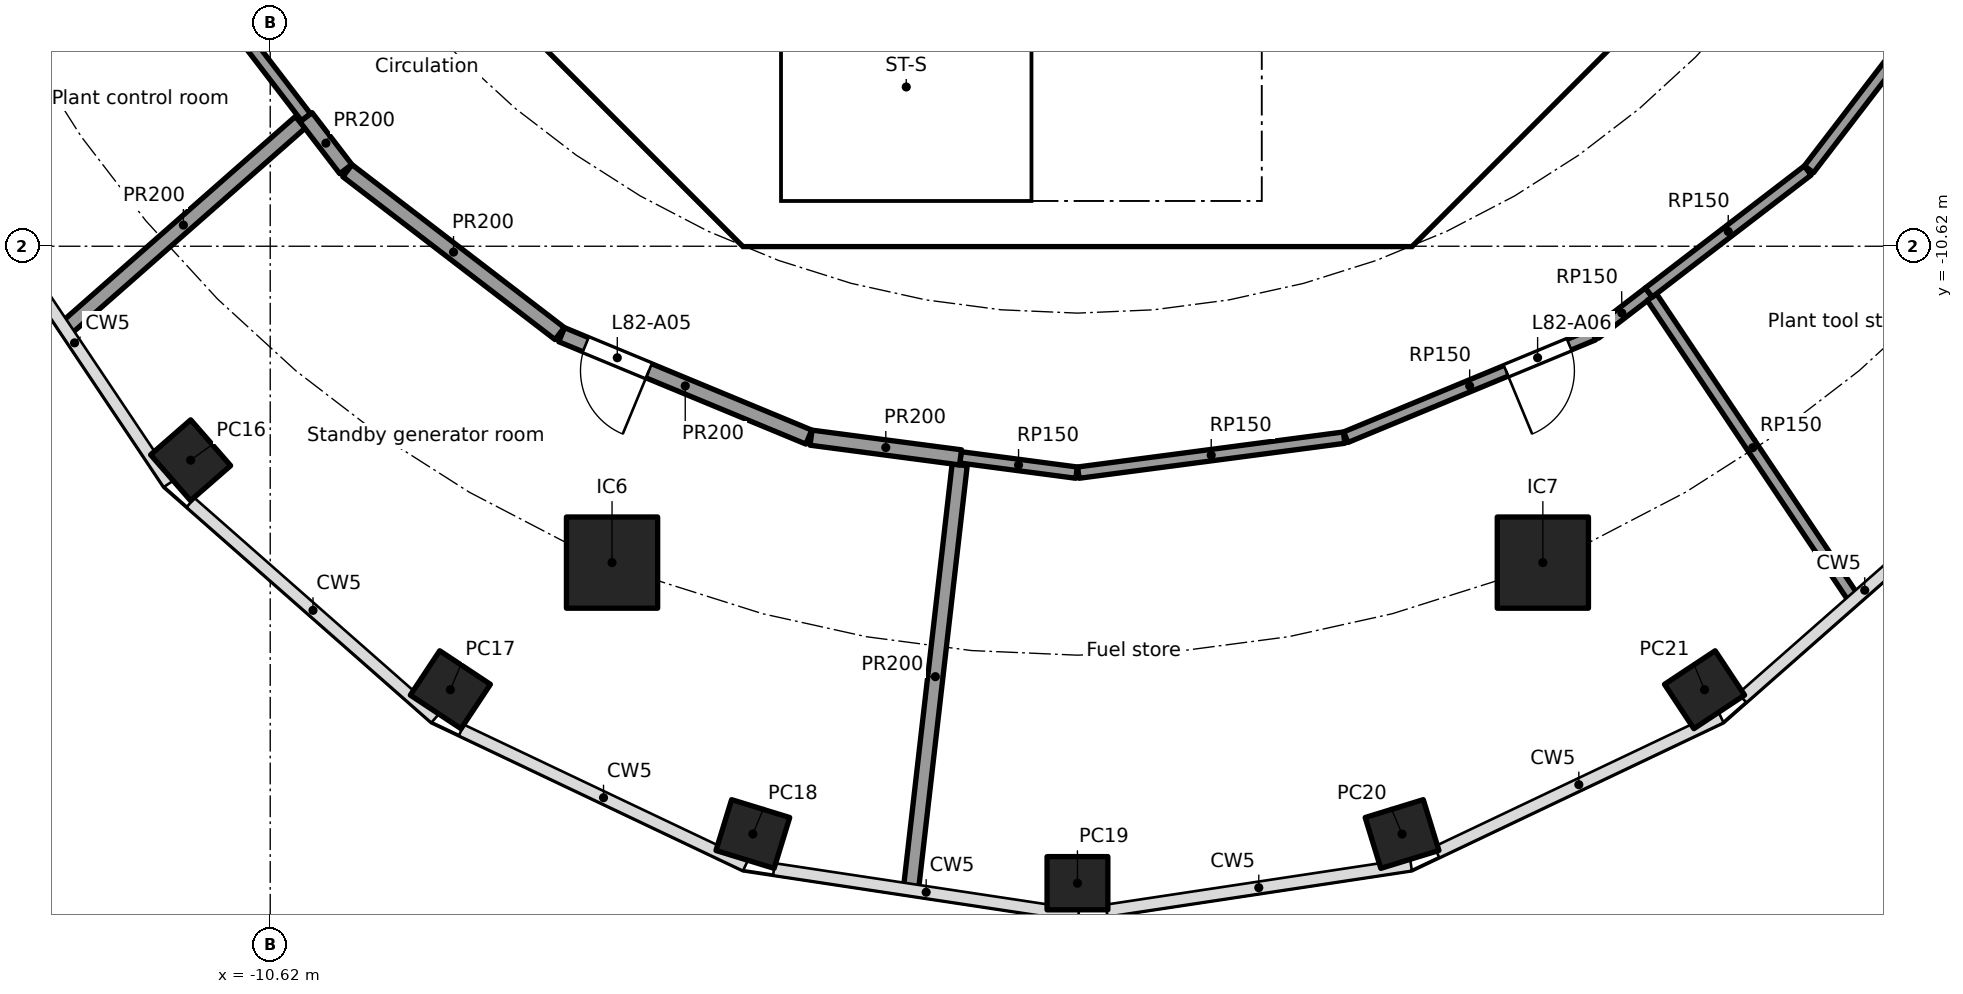
"""IFC4 building model, lengths in metres.
Left out: names, types, materials, properties, quantities, classifications, styles, units other than length and angle.
Written with IfcOpenShell. Run it as: python <this file> out.ifc"""

import sys

from ifc_helpers import new_model, si_unit, direction, frame, frame_2d, origin, origin_2d, place, context, subcontext, project, spatial, polyline, rectangle, hollow_rectangle, outline, extrude, element, fill, save


model = new_model("IFC4")
c1 = context("Model", 3, precision=1e-05, world=origin(), true_north=direction((0.0, 1.0)))
c2 = subcontext(c1, "Body", "Model", "MODEL_VIEW")
j1 = project(units=[si_unit("LENGTHUNIT", "METRE"), si_unit("PLANEANGLEUNIT", "RADIAN")], contexts=[c1])
p1 = place(None, origin())
s1 = spatial("IfcSite", under=j1, at=p1, CompositionType="ELEMENT")
p2 = place(p1, origin())
s2 = spatial("IfcBuilding", under=s1, at=p2, CompositionType="ELEMENT")
p3 = place(p2, frame((0.0, 0.0, 332.9)))
s3 = spatial("IfcBuildingStorey", under=s2, at=p3, CompositionType="ELEMENT", Elevation=332.9)
for number, where, z_axis, x_axis in (
    (1, (-11.667, -13.435, 0.0), (0.0, 0.0, 1.0), (0.657, -0.754, 0.0)),
    (2, (-8.25, -16.455, 0.0), (0.0, 0.0, 1.0), (0.834, -0.552, 0.0)),
    (3, (-4.271, -18.353, 0.0), (0.0, 0.0, 1.0), (0.956, -0.294, 0.0)),
    (4, (0.0, -19.0, 0.0), (0.0, 0.0, 1.0), (1.0, 0.0, 0.0)),
    (5, (4.271, -18.353, 0.0), (0.0, 0.0, 1.0), (0.956, 0.294, 0.0)),
    (6, (8.25, -16.455, 0.0), (0.0, 0.0, 1.0), (0.834, 0.552, 0.0)),
):
    element("IfcColumn", number, at=place(p3, frame(where, z_axis=z_axis, x_axis=x_axis)), inside=s3, PredefinedType="COLUMN", context=c2, shape_type="SweptSolid", body=[
        extrude(hollow_rectangle(XDim=0.8, YDim=0.7, WallThickness=0.025, at=origin_2d()), origin(), (0.0, 0.0, 1.0), 4.0),
    ])
for number, where, z_axis, x_axis in (
    (7, (-6.123, -14.782, 0.0), (0.0, 0.0, 1.0), (1.0, 0.0, 0.0)),
    (8, (6.123, -14.782, 0.0), (0.0, 0.0, 1.0), (1.0, 0.0, 0.0)),
):
    element("IfcColumn", number, at=place(p3, frame(where, z_axis=z_axis, x_axis=x_axis)), inside=s3, PredefinedType="COLUMN", context=c2, shape_type="SweptSolid", body=[
        extrude(rectangle(XDim=1.2, YDim=1.2, at=origin_2d()), origin(), (0.0, 0.0, 1.0), 4.0),
    ])
p4 = place(p3, frame((-9.988, -4.613, 0.0), z_axis=(0.0, 0.0, 1.0), x_axis=(0.707106781187, -0.707106781187, 0.0)))
e9 = element("IfcWall", 9, at=p4, inside=s3, PredefinedType="SHEAR", context=c2, shape_type="SweptSolid", body=[
    extrude(rectangle(XDim=7.602, YDim=0.6, at=frame_2d((3.801, 0.0))), origin(), (0.0, 0.0, 1.0), 3.7),
])
p5 = place(p4, frame((6.151, 0.0, 0.0)))
e10 = element("IfcOpeningElement", 10, at=p5, cuts=e9, PredefinedType="OPENING", context=c2, shape_type="SweptSolid", body=[
    extrude(rectangle(XDim=1.1, YDim=2.1, at=frame_2d((0.55, 1.05))), frame((0.0, 0.31, 0.0), z_axis=(0.0, -1.0, 0.0), x_axis=(1.0, 0.0, 0.0)), (0.0, 0.0, 1.0), 0.62),
])
p6 = place(p3, frame((4.613, -9.988, 0.0), z_axis=(0.0, 0.0, 1.0), x_axis=(0.707106781187, 0.707106781187, 0.0)))
e11 = element("IfcWall", 11, at=p6, inside=s3, PredefinedType="SHEAR", context=c2, shape_type="SweptSolid", body=[
    extrude(rectangle(XDim=7.602, YDim=0.6, at=frame_2d((3.801, 0.0))), origin(), (0.0, 0.0, 1.0), 3.7),
])
p7 = place(p6, frame((3.201, 0.0, 0.0)))
e12 = element("IfcOpeningElement", 12, at=p7, cuts=e11, PredefinedType="OPENING", context=c2, shape_type="SweptSolid", body=[
    extrude(rectangle(XDim=1.2, YDim=2.1, at=frame_2d((0.6, 1.05))), frame((0.0, 0.31, 0.0), z_axis=(0.0, -1.0, 0.0), x_axis=(1.0, 0.0, 0.0)), (0.0, 0.0, 1.0), 0.62),
])
p8 = place(p3, frame((4.0, -10.025, 0.0), z_axis=(0.0, 0.0, 1.0), x_axis=(0.0, 1.0, 0.0)))
e13 = element("IfcWall", 13, at=p8, inside=s3, PredefinedType="SOLIDWALL", context=c2, shape_type="SweptSolid", body=[
    extrude(rectangle(XDim=3.0, YDim=0.2, at=frame_2d((1.5, 0.0))), origin(), (0.0, 0.0, 1.0), 3.7),
])
p9 = place(p8, frame((0.975, 0.0, 0.0)))
e14 = element("IfcOpeningElement", 14, at=p9, cuts=e13, PredefinedType="OPENING", context=c2, shape_type="SweptSolid", body=[
    extrude(rectangle(XDim=1.1, YDim=2.1, at=frame_2d((0.55, 1.05))), frame((0.0, 0.11, 0.0), z_axis=(0.0, -1.0, 0.0), x_axis=(1.0, 0.0, 0.0)), (0.0, 0.0, 1.0), 0.22),
])
p10 = place(p3, origin())
e15 = element("IfcWall", 15, at=p10, inside=s3, PredefinedType="SHEAR", context=c2, shape_type="SweptSolid", body=[
    extrude(outline(polyline([(-4.152, -10.025), (4.152, -10.025), (4.401, -9.776), (4.825, -10.2), (4.401, -10.625), (-4.401, -10.625), (-4.825, -10.2), (-4.401, -9.776), (-4.152, -10.025)])), origin(), (0.0, 0.0, 1.0), 3.7),
])
p11 = place(p3, origin())
e16 = element("IfcWall", 16, at=p11, inside=s3, PredefinedType="SOLIDWALL", context=c2, shape_type="SweptSolid", body=[
    extrude(outline(polyline([(-3.9, -10.025), (-4.1, -10.025), (-4.1, -7.025), (-3.9, -7.025), (-3.9, -10.025)])), origin(), (0.0, 0.0, 1.0), 3.7),
])
p12 = place(p3, frame((-10.149, -8.923, 0.0), z_axis=(0.0, 0.0, 1.0), x_axis=(-0.608731606531, 0.793376222993, 0.0)))
e17 = element("IfcWall", 17, at=p12, inside=s3, PredefinedType="PARTITIONING", context=c2, shape_type="SweptSolid", body=[
    extrude(rectangle(XDim=2.664, YDim=0.15, at=frame_2d((1.332, 0.0))), origin(), (0.0, 0.0, 1.0), 3.7),
])
p13 = place(p3, frame((-0.012, -13.598, 0.0), z_axis=(0.0, 0.0, 1.0), x_axis=(-0.991446737275, 0.130511942543, 0.0)))
e18 = element("IfcWall", 18, at=p13, inside=s3, PredefinedType="PARTITIONING", context=c2, shape_type="SweptSolid", body=[
    extrude(rectangle(XDim=1.54, YDim=0.15, at=frame_2d((0.77, 0.0))), origin(), (0.0, 0.0, 1.0), 3.7),
])
p14 = place(p3, frame((3.508, -13.138, 0.0), z_axis=(0.0, 0.0, 1.0), x_axis=(-0.991448403586, -0.130499283623, 0.0)))
e19 = element("IfcWall", 19, at=p14, inside=s3, PredefinedType="PARTITIONING", context=c2, shape_type="SweptSolid", body=[
    extrude(rectangle(XDim=3.527, YDim=0.15, at=frame_2d((1.763, 0.0))), origin(), (0.0, 0.0, 1.0), 3.7),
])
p15 = place(p3, frame((6.789, -11.782, 0.0), z_axis=(0.0, 0.0, 1.0), x_axis=(-0.923881838111, -0.382677866108, 0.0)))
e20 = element("IfcWall", 20, at=p15, inside=s3, PredefinedType="PARTITIONING", context=c2, shape_type="SweptSolid", body=[
    extrude(rectangle(XDim=3.527, YDim=0.15, at=frame_2d((1.763, 0.0))), origin(), (0.0, 0.0, 1.0), 3.7),
])
p16 = place(p15, frame((0.346, 0.0, 0.0)))
e21 = element("IfcOpeningElement", 21, at=p16, cuts=e20, PredefinedType="OPENING", context=c2, shape_type="SweptSolid", body=[
    extrude(rectangle(XDim=0.9, YDim=2.1, at=frame_2d((0.45, 1.05))), frame((0.0, 0.085, 0.0), z_axis=(0.0, -1.0, 0.0), x_axis=(1.0, 0.0, 0.0)), (0.0, 0.0, 1.0), 0.17),
])
p17 = place(p3, frame((7.517, -11.228, 0.0), z_axis=(0.0, 0.0, 1.0), x_axis=(-0.79334623579, -0.608770687663, 0.0)))
e22 = element("IfcWall", 22, at=p17, inside=s3, PredefinedType="PARTITIONING", context=c2, shape_type="SweptSolid", body=[
    extrude(rectangle(XDim=0.892, YDim=0.15, at=frame_2d((0.446, 0.0))), origin(), (0.0, 0.0, 1.0), 3.7),
])
p18 = place(p3, frame((7.558, -11.291, 0.0), z_axis=(0.0, 0.0, 1.0), x_axis=(0.55629544905, -0.830984580703, 0.0)))
e23 = element("IfcWall", 23, at=p18, inside=s3, PredefinedType="PARTITIONING", context=c2, shape_type="SweptSolid", body=[
    extrude(rectangle(XDim=4.765, YDim=0.15, at=frame_2d((2.382, 0.0))), origin(), (0.0, 0.0, 1.0), 3.7),
])
p19 = place(p3, frame((9.607, -9.624, 0.0), z_axis=(0.0, 0.0, 1.0), x_axis=(-0.793381127635, -0.608725214126, 0.0)))
e24 = element("IfcWall", 24, at=p19, inside=s3, PredefinedType="PARTITIONING", context=c2, shape_type="SweptSolid", body=[
    extrude(rectangle(XDim=2.635, YDim=0.15, at=frame_2d((1.317, 0.0))), origin(), (0.0, 0.0, 1.0), 3.7),
])
p20 = place(p3, frame((11.771, -6.809, 0.0), z_axis=(0.0, 0.0, 1.0), x_axis=(-0.608736710054, -0.793372307201, 0.0)))
e25 = element("IfcWall", 25, at=p20, inside=s3, PredefinedType="PARTITIONING", context=c2, shape_type="SweptSolid", body=[
    extrude(rectangle(XDim=3.527, YDim=0.15, at=frame_2d((1.763, 0.0))), origin(), (0.0, 0.0, 1.0), 3.7),
])
p21 = place(p3, frame((-10.224, -8.989, 0.0), z_axis=(0.0, 0.0, 1.0), x_axis=(-0.750994766266, -0.660308156122, 0.0)))
e26 = element("IfcWall", 26, at=p21, inside=s3, PredefinedType="PARTITIONING", context=c2, shape_type="SweptSolid", body=[
    extrude(rectangle(XDim=4.097, YDim=0.2, at=frame_2d((2.049, 0.0))), origin(), (0.0, 0.0, 1.0), 3.7),
])
p22 = place(p3, frame((-9.626, -9.605, 0.0), z_axis=(0.0, 0.0, 1.0), x_axis=(-0.608694005511, 0.793405071609, 0.0)))
e27 = element("IfcWall", 27, at=p22, inside=s3, PredefinedType="PARTITIONING", context=c2, shape_type="SweptSolid", body=[
    extrude(rectangle(XDim=0.859, YDim=0.2, at=frame_2d((0.43, 0.0))), origin(), (0.0, 0.0, 1.0), 3.7),
])
p23 = place(p3, frame((-6.812, -11.769, 0.0), z_axis=(0.0, 0.0, 1.0), x_axis=(-0.793402024283, 0.608697977542, 0.0)))
e28 = element("IfcWall", 28, at=p23, inside=s3, PredefinedType="PARTITIONING", context=c2, shape_type="SweptSolid", body=[
    extrude(rectangle(XDim=3.52, YDim=0.2, at=frame_2d((1.76, 0.0))), origin(), (0.0, 0.0, 1.0), 3.7),
])
p24 = place(p3, frame((-3.534, -13.131, 0.0), z_axis=(0.0, 0.0, 1.0), x_axis=(-0.92386297064, 0.382723413813, 0.0)))
e29 = element("IfcWall", 29, at=p24, inside=s3, PredefinedType="PARTITIONING", context=c2, shape_type="SweptSolid", body=[
    extrude(rectangle(XDim=3.52, YDim=0.2, at=frame_2d((1.76, 0.0))), origin(), (0.0, 0.0, 1.0), 3.7),
])
p25 = place(p24, frame((2.278, 0.0, 0.0)))
e30 = element("IfcOpeningElement", 30, at=p25, cuts=e29, PredefinedType="OPENING", context=c2, shape_type="SweptSolid", body=[
    extrude(rectangle(XDim=0.9, YDim=2.1, at=frame_2d((0.45, 1.05))), frame((0.0, 0.11, 0.0), z_axis=(0.0, -1.0, 0.0), x_axis=(1.0, 0.0, 0.0)), (0.0, 0.0, 1.0), 0.22),
])
p26 = place(p3, frame((-2.189, -19.068, 0.0), z_axis=(0.0, 0.0, 1.0), x_axis=(0.114057329834, 0.993474169524, 0.0)))
e31 = element("IfcWall", 31, at=p26, inside=s3, PredefinedType="PARTITIONING", context=c2, shape_type="SweptSolid", body=[
    extrude(rectangle(XDim=5.608, YDim=0.2, at=frame_2d((2.804, 0.0))), origin(), (0.0, 0.0, 1.0), 3.7),
])
p27 = place(p3, frame((-1.538, -13.397, 0.0), z_axis=(0.0, 0.0, 1.0), x_axis=(-0.991454295543, 0.130454512571, 0.0)))
e32 = element("IfcWall", 32, at=p27, inside=s3, PredefinedType="PARTITIONING", context=c2, shape_type="SweptSolid", body=[
    extrude(rectangle(XDim=1.984, YDim=0.2, at=frame_2d((0.992, 0.0))), origin(), (0.0, 0.0, 1.0), 3.7),
])
p28 = place(p9, origin())
e33 = element("IfcDoor", 33, at=p28, inside=s3, OperationType="SINGLE_SWING_RIGHT", PredefinedType="DOOR", context=c2, shape_type="SweptSolid", body=[
    extrude(rectangle(XDim=1.1, YDim=2.1, at=frame_2d((0.55, 1.05))), frame((0.0, 0.025, 0.0), z_axis=(0.0, -1.0, 0.0), x_axis=(1.0, 0.0, 0.0)), (0.0, 0.0, 1.0), 0.05),
])
fill(e14, e33)
p29 = place(p5, origin())
e34 = element("IfcDoor", 34, at=p29, inside=s3, OperationType="SINGLE_SWING_RIGHT", PredefinedType="DOOR", context=c2, shape_type="SweptSolid", body=[
    extrude(rectangle(XDim=1.1, YDim=2.1, at=frame_2d((0.55, 1.05))), frame((0.0, 0.025, 0.0), z_axis=(0.0, -1.0, 0.0), x_axis=(1.0, 0.0, 0.0)), (0.0, 0.0, 1.0), 0.05),
])
fill(e10, e34)
p30 = place(p25, origin())
e35 = element("IfcDoor", 35, at=p30, inside=s3, OperationType="SINGLE_SWING_LEFT", PredefinedType="DOOR", context=c2, shape_type="SweptSolid", body=[
    extrude(rectangle(XDim=0.9, YDim=2.1, at=frame_2d((0.45, 1.05))), frame((0.0, 0.025, 0.0), z_axis=(0.0, -1.0, 0.0), x_axis=(1.0, 0.0, 0.0)), (0.0, 0.0, 1.0), 0.05),
])
fill(e30, e35)
p31 = place(p16, origin())
e36 = element("IfcDoor", 36, at=p31, inside=s3, OperationType="SINGLE_SWING_RIGHT", PredefinedType="DOOR", context=c2, shape_type="SweptSolid", body=[
    extrude(rectangle(XDim=0.9, YDim=2.1, at=frame_2d((0.45, 1.05))), frame((0.0, 0.025, 0.0), z_axis=(0.0, -1.0, 0.0), x_axis=(1.0, 0.0, 0.0)), (0.0, 0.0, 1.0), 0.05),
])
fill(e21, e36)
save(model, sys.argv[1])
